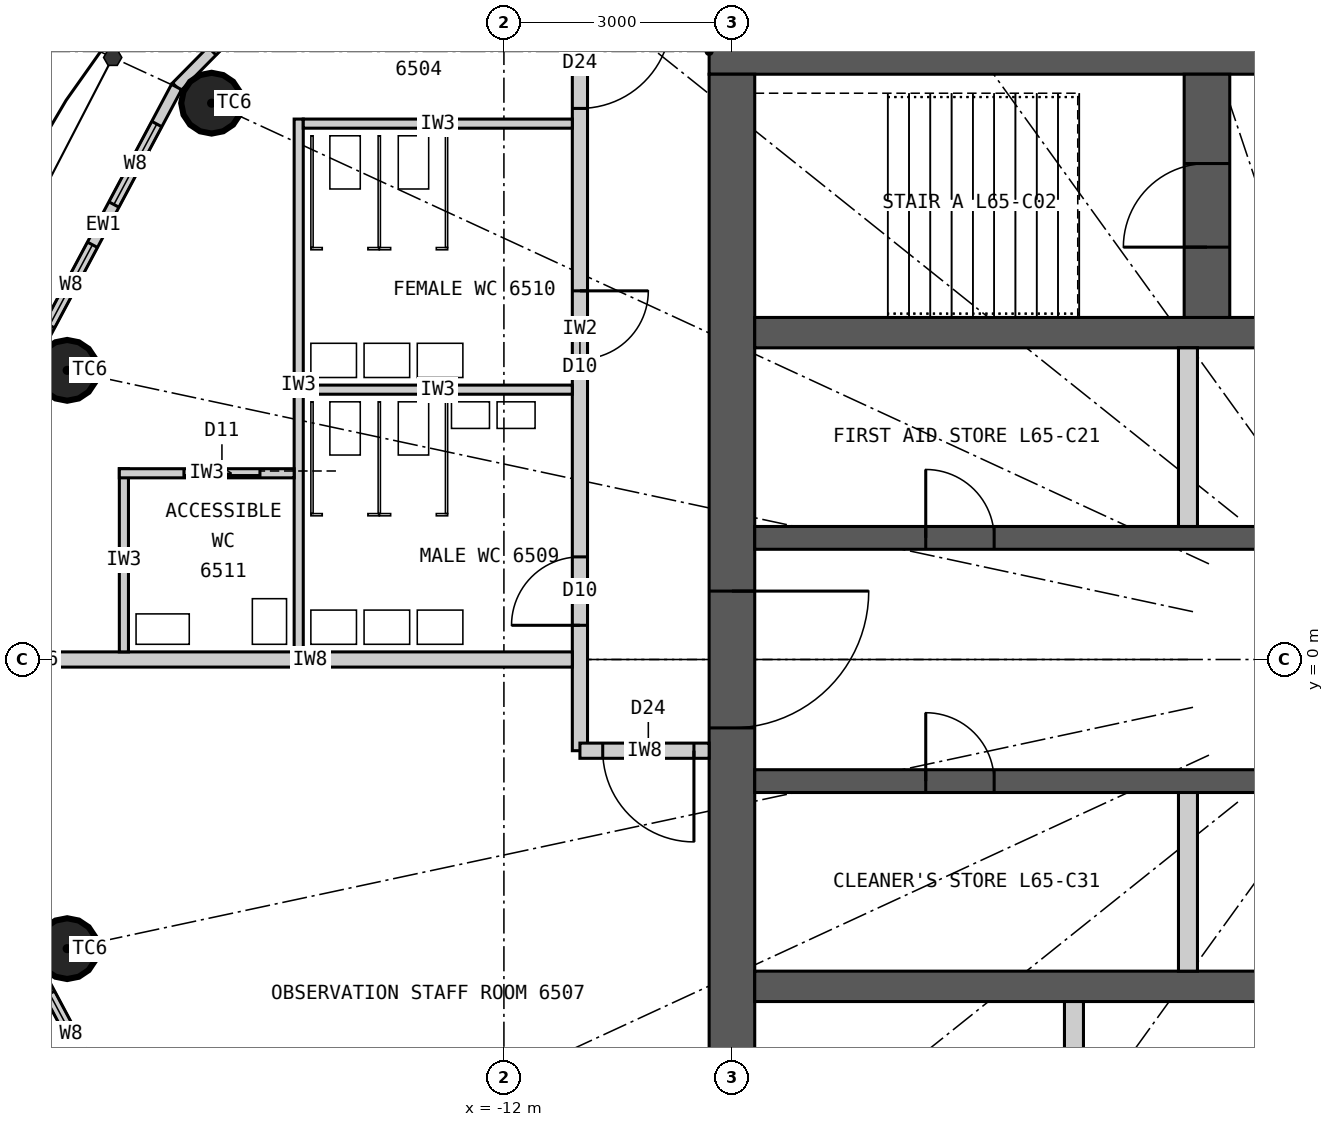
"""IFC4 building model, lengths in metres.
Left out: names, types, materials, properties, quantities, classifications, styles, units other than length and angle.
Written with IfcOpenShell. Run it as: python <this file> out.ifc"""

import sys

from ifc_helpers import new_model, si_unit, direction, frame, frame_2d, origin, origin_2d, place, context, subcontext, project, spatial, rectangle, circle, extrude, element, fill, save


model = new_model("IFC4")
c1 = context("Model", 3, precision=1e-05, world=origin(), true_north=direction((0.0, 1.0)))
c2 = subcontext(c1, "Body", "Model", "MODEL_VIEW")
j1 = project(units=[si_unit("LENGTHUNIT", "METRE"), si_unit("PLANEANGLEUNIT", "RADIAN")], contexts=[c1])
p1 = place(None, origin())
s1 = spatial("IfcSite", under=j1, at=p1, CompositionType="ELEMENT")
p2 = place(p1, origin())
s2 = spatial("IfcBuilding", under=s1, at=p2, CompositionType="ELEMENT")
p3 = place(p2, frame((0.0, 0.0, 242.7)))
s3 = spatial("IfcBuildingStorey", under=s2, at=p3, CompositionType="ELEMENT", Elevation=242.7)
for number, where, z_axis, x_axis in (
    (1, (-15.846, 7.319, 0.0), (0.0, 0.0, 1.0), (1.0, 0.0, 0.0)),
    (2, (-17.746, 3.804, 0.0), (0.0, 0.0, 1.0), (1.0, 0.0, 0.0)),
    (3, (-17.746, -3.804, 0.0), (0.0, 0.0, 1.0), (1.0, 0.0, 0.0)),
):
    element("IfcColumn", number, at=place(p3, frame(where, z_axis=z_axis, x_axis=x_axis)), inside=s3, PredefinedType="COLUMN", context=c2, shape_type="SweptSolid", body=[
        extrude(circle(Radius=0.4, at=origin_2d()), origin(), (0.0, 0.0, 1.0), 6.0),
    ])
p4 = place(p3, frame((-9.3, 8.0, 0.0), z_axis=(0.0, 0.0, 1.0), x_axis=(1.0, 0.0, 0.0)))
e4 = element("IfcWall", 4, at=p4, inside=s3, PredefinedType="SHEAR", context=c2, shape_type="SweptSolid", body=[
    extrude(rectangle(XDim=18.6, YDim=0.6, at=frame_2d((9.3, 0.0))), origin(), (0.0, 0.0, 1.0), 6.0),
])
p5 = place(p4, frame((8.0, 0.0, 0.0)))
e5 = element("IfcOpeningElement", 5, at=p5, cuts=e4, PredefinedType="OPENING", context=c2, shape_type="SweptSolid", body=[
    extrude(rectangle(XDim=1.2, YDim=2.2, at=frame_2d((0.6, 1.1))), frame((0.0, 0.31, 0.0), z_axis=(0.0, -1.0, 0.0), x_axis=(1.0, 0.0, 0.0)), (0.0, 0.0, 1.0), 0.62),
])
p6 = place(p4, frame((15.6, 0.0, 0.0)))
e6 = element("IfcOpeningElement", 6, at=p6, cuts=e4, PredefinedType="OPENING", context=c2, shape_type="SweptSolid", body=[
    extrude(rectangle(XDim=0.9, YDim=2.2, at=frame_2d((0.45, 1.1))), frame((0.0, 0.31, 0.0), z_axis=(0.0, -1.0, 0.0), x_axis=(1.0, 0.0, 0.0)), (0.0, 0.0, 1.0), 0.62),
])
p7 = place(p3, frame((-9.0, 7.7, 0.0), z_axis=(0.0, 0.0, 1.0), x_axis=(0.0, -1.0, 0.0)))
e7 = element("IfcWall", 7, at=p7, inside=s3, PredefinedType="SHEAR", context=c2, shape_type="SweptSolid", body=[
    extrude(rectangle(XDim=15.4, YDim=0.6, at=frame_2d((7.7, 0.0))), origin(), (0.0, 0.0, 1.0), 6.0),
])
p8 = place(p7, frame((6.8, 0.0, 0.0)))
e8 = element("IfcOpeningElement", 8, at=p8, cuts=e7, PredefinedType="OPENING", context=c2, shape_type="SweptSolid", body=[
    extrude(rectangle(XDim=1.8, YDim=2.2, at=frame_2d((0.9, 1.1))), frame((0.0, 0.31, 0.0), z_axis=(0.0, -1.0, 0.0), x_axis=(1.0, 0.0, 0.0)), (0.0, 0.0, 1.0), 0.62),
])
p9 = place(p3, frame((-8.7, 4.3, 0.0), z_axis=(0.0, 0.0, 1.0), x_axis=(1.0, 0.0, 0.0)))
e9 = element("IfcWall", 9, at=p9, inside=s3, PredefinedType="SHEAR", context=c2, shape_type="SweptSolid", body=[
    extrude(rectangle(XDim=17.4, YDim=0.4, at=frame_2d((8.7, 0.0))), origin(), (0.0, 0.0, 1.0), 6.0),
])
p10 = place(p3, frame((-8.7, 1.6, 0.0), z_axis=(0.0, 0.0, 1.0), x_axis=(1.0, 0.0, 0.0)))
e10 = element("IfcWall", 10, at=p10, inside=s3, PredefinedType="SHEAR", context=c2, shape_type="SweptSolid", body=[
    extrude(rectangle(XDim=17.4, YDim=0.3, at=frame_2d((8.7, 0.0))), origin(), (0.0, 0.0, 1.0), 6.0),
])
p11 = place(p10, frame((15.5, 0.0, 0.0)))
e11 = element("IfcOpeningElement", 11, at=p11, cuts=e10, PredefinedType="OPENING", context=c2, shape_type="SweptSolid", body=[
    extrude(rectangle(XDim=1.4, YDim=2.4, at=frame_2d((0.7, 1.2))), frame((0.0, 0.16, 0.0), z_axis=(0.0, -1.0, 0.0), x_axis=(1.0, 0.0, 0.0)), (0.0, 0.0, 1.0), 0.32),
])
p12 = place(p10, frame((2.25, 0.0, 0.0)))
e12 = element("IfcOpeningElement", 12, at=p12, cuts=e10, PredefinedType="OPENING", context=c2, shape_type="SweptSolid", body=[
    extrude(rectangle(XDim=0.9, YDim=2.2, at=frame_2d((0.45, 1.1))), frame((0.0, 0.16, 0.0), z_axis=(0.0, -1.0, 0.0), x_axis=(1.0, 0.0, 0.0)), (0.0, 0.0, 1.0), 0.32),
])
p13 = place(p10, frame((9.75, 0.0, 0.0)))
e13 = element("IfcOpeningElement", 13, at=p13, cuts=e10, PredefinedType="OPENING", context=c2, shape_type="SweptSolid", body=[
    extrude(rectangle(XDim=0.9, YDim=2.2, at=frame_2d((0.45, 1.1))), frame((0.0, 0.16, 0.0), z_axis=(0.0, -1.0, 0.0), x_axis=(1.0, 0.0, 0.0)), (0.0, 0.0, 1.0), 0.32),
])
p14 = place(p3, frame((-8.7, -4.3, 0.0), z_axis=(0.0, 0.0, 1.0), x_axis=(1.0, 0.0, 0.0)))
e14 = element("IfcWall", 14, at=p14, inside=s3, PredefinedType="SHEAR", context=c2, shape_type="SweptSolid", body=[
    extrude(rectangle(XDim=17.4, YDim=0.4, at=frame_2d((8.7, 0.0))), origin(), (0.0, 0.0, 1.0), 6.0),
])
p15 = place(p3, frame((-8.7, -1.6, 0.0), z_axis=(0.0, 0.0, 1.0), x_axis=(1.0, 0.0, 0.0)))
e15 = element("IfcWall", 15, at=p15, inside=s3, PredefinedType="SHEAR", context=c2, shape_type="SweptSolid", body=[
    extrude(rectangle(XDim=17.4, YDim=0.3, at=frame_2d((8.7, 0.0))), origin(), (0.0, 0.0, 1.0), 6.0),
])
p16 = place(p15, frame((12.4, 0.0, 0.0)))
e16 = element("IfcOpeningElement", 16, at=p16, cuts=e15, PredefinedType="OPENING", context=c2, shape_type="SweptSolid", body=[
    extrude(rectangle(XDim=1.6, YDim=2.4, at=frame_2d((0.8, 1.2))), frame((0.0, 0.16, 0.0), z_axis=(0.0, -1.0, 0.0), x_axis=(1.0, 0.0, 0.0)), (0.0, 0.0, 1.0), 0.32),
])
p17 = place(p15, frame((15.5, 0.0, 0.0)))
e17 = element("IfcOpeningElement", 17, at=p17, cuts=e15, PredefinedType="OPENING", context=c2, shape_type="SweptSolid", body=[
    extrude(rectangle(XDim=1.4, YDim=2.4, at=frame_2d((0.7, 1.2))), frame((0.0, 0.16, 0.0), z_axis=(0.0, -1.0, 0.0), x_axis=(1.0, 0.0, 0.0)), (0.0, 0.0, 1.0), 0.32),
])
p18 = place(p15, frame((2.25, 0.0, 0.0)))
e18 = element("IfcOpeningElement", 18, at=p18, cuts=e15, PredefinedType="OPENING", context=c2, shape_type="SweptSolid", body=[
    extrude(rectangle(XDim=0.9, YDim=2.2, at=frame_2d((0.45, 1.1))), frame((0.0, 0.16, 0.0), z_axis=(0.0, -1.0, 0.0), x_axis=(1.0, 0.0, 0.0)), (0.0, 0.0, 1.0), 0.32),
])
p19 = place(p15, frame((8.25, 0.0, 0.0)))
e19 = element("IfcOpeningElement", 19, at=p19, cuts=e15, PredefinedType="OPENING", context=c2, shape_type="SweptSolid", body=[
    extrude(rectangle(XDim=0.9, YDim=2.2, at=frame_2d((0.45, 1.1))), frame((0.0, 0.16, 0.0), z_axis=(0.0, -1.0, 0.0), x_axis=(1.0, 0.0, 0.0)), (0.0, 0.0, 1.0), 0.32),
])
p20 = place(p3, frame((-2.75, 4.5, 0.0), z_axis=(0.0, 0.0, 1.0), x_axis=(0.0, 1.0, 0.0)))
e20 = element("IfcWall", 20, at=p20, inside=s3, PredefinedType="SHEAR", context=c2, shape_type="SweptSolid", body=[
    extrude(rectangle(XDim=3.2, YDim=0.6, at=frame_2d((1.6, 0.0))), origin(), (0.0, 0.0, 1.0), 6.0),
])
p21 = place(p20, frame((0.925, 0.0, 0.0)))
e21 = element("IfcOpeningElement", 21, at=p21, cuts=e20, PredefinedType="OPENING", context=c2, shape_type="SweptSolid", body=[
    extrude(rectangle(XDim=1.1, YDim=2.2, at=frame_2d((0.55, 1.1))), frame((0.0, 0.31, 0.0), z_axis=(0.0, -1.0, 0.0), x_axis=(1.0, 0.0, 0.0)), (0.0, 0.0, 1.0), 0.62),
])
p22 = place(p3, frame((-4.5, -7.7, 0.0), z_axis=(0.0, 0.0, 1.0), x_axis=(0.0, 1.0, 0.0)))
e22 = element("IfcWall", 22, at=p22, inside=s3, PredefinedType="PARTITIONING", context=c2, shape_type="SweptSolid", body=[
    extrude(rectangle(XDim=3.2, YDim=0.25, at=frame_2d((1.6, 0.0))), origin(), (0.0, 0.0, 1.0), 6.0),
])
for number, where, z_axis, x_axis in (
    (23, (-3.0, 1.75, 0.0), (0.0, 0.0, 1.0), (0.0, 1.0, 0.0)),
    (24, (-3.0, -4.1, 0.0), (0.0, 0.0, 1.0), (0.0, 1.0, 0.0)),
):
    element("IfcWall", number, at=place(p3, frame(where, z_axis=z_axis, x_axis=x_axis)), inside=s3, PredefinedType="PARTITIONING", context=c2, shape_type="SweptSolid", body=[
        extrude(rectangle(XDim=2.35, YDim=0.25, at=frame_2d((1.175, 0.0))), origin(), (0.0, 0.0, 1.0), 6.0),
    ])
p23 = place(p3, frame((-13.266, 10.613, 0.0), z_axis=(0.0, 0.0, 1.0), x_axis=(-0.702523956258, -0.711660095048, 0.0)))
e25 = element("IfcWall", 25, at=p23, inside=s3, PredefinedType="ELEMENTEDWALL", context=c2, shape_type="SweptSolid", body=[
    extrude(rectangle(XDim=4.329, YDim=0.15, at=frame_2d((2.165, 0.0))), origin(), (0.0, 0.0, 1.0), 5.7),
])
p24 = place(p23, frame((0.665, 0.0, 0.5)))
e26 = element("IfcOpeningElement", 26, at=p24, cuts=e25, PredefinedType="OPENING", context=c2, shape_type="SweptSolid", body=[
    extrude(rectangle(XDim=1.2, YDim=4.2, at=frame_2d((0.6, 2.1))), frame((0.0, 0.085, 0.0), z_axis=(0.0, -1.0, 0.0), x_axis=(1.0, 0.0, 0.0)), (0.0, 0.0, 1.0), 0.17),
])
p25 = place(p23, frame((2.465, 0.0, 0.5)))
e27 = element("IfcOpeningElement", 27, at=p25, cuts=e25, PredefinedType="OPENING", context=c2, shape_type="SweptSolid", body=[
    extrude(rectangle(XDim=1.2, YDim=4.2, at=frame_2d((0.6, 2.1))), frame((0.0, 0.085, 0.0), z_axis=(0.0, -1.0, 0.0), x_axis=(1.0, 0.0, 0.0)), (0.0, 0.0, 1.0), 0.17),
])
p26 = place(p3, frame((-16.307, 7.532, 0.0), z_axis=(0.0, 0.0, 1.0), x_axis=(-0.470282591286, -0.882515883332, 0.0)))
e28 = element("IfcWall", 28, at=p26, inside=s3, PredefinedType="ELEMENTEDWALL", context=c2, shape_type="SweptSolid", body=[
    extrude(rectangle(XDim=4.105, YDim=0.15, at=frame_2d((2.052, 0.0))), origin(), (0.0, 0.0, 1.0), 5.7),
])
p27 = place(p26, frame((0.552, 0.0, 0.5)))
e29 = element("IfcOpeningElement", 29, at=p27, cuts=e28, PredefinedType="OPENING", context=c2, shape_type="SweptSolid", body=[
    extrude(rectangle(XDim=1.2, YDim=4.2, at=frame_2d((0.6, 2.1))), frame((0.0, 0.085, 0.0), z_axis=(0.0, -1.0, 0.0), x_axis=(1.0, 0.0, 0.0)), (0.0, 0.0, 1.0), 0.17),
])
p28 = place(p26, frame((2.353, 0.0, 0.5)))
e30 = element("IfcOpeningElement", 30, at=p28, cuts=e28, PredefinedType="OPENING", context=c2, shape_type="SweptSolid", body=[
    extrude(rectangle(XDim=1.2, YDim=4.2, at=frame_2d((0.6, 2.1))), frame((0.0, 0.085, 0.0), z_axis=(0.0, -1.0, 0.0), x_axis=(1.0, 0.0, 0.0)), (0.0, 0.0, 1.0), 0.17),
])
p29 = place(p3, frame((-18.238, -3.909, 0.0), z_axis=(0.0, 0.0, 1.0), x_axis=(0.470282591286, -0.882515883332, 0.0)))
e31 = element("IfcWall", 31, at=p29, inside=s3, PredefinedType="ELEMENTEDWALL", context=c2, shape_type="SweptSolid", body=[
    extrude(rectangle(XDim=4.105, YDim=0.15, at=frame_2d((2.052, 0.0))), origin(), (0.0, 0.0, 1.0), 5.7),
])
p30 = place(p29, frame((0.552, 0.0, 0.5)))
e32 = element("IfcOpeningElement", 32, at=p30, cuts=e31, PredefinedType="OPENING", context=c2, shape_type="SweptSolid", body=[
    extrude(rectangle(XDim=1.2, YDim=4.2, at=frame_2d((0.6, 2.1))), frame((0.0, 0.085, 0.0), z_axis=(0.0, -1.0, 0.0), x_axis=(1.0, 0.0, 0.0)), (0.0, 0.0, 1.0), 0.17),
])
p31 = place(p29, frame((2.353, 0.0, 0.5)))
e33 = element("IfcOpeningElement", 33, at=p31, cuts=e31, PredefinedType="OPENING", context=c2, shape_type="SweptSolid", body=[
    extrude(rectangle(XDim=1.2, YDim=4.2, at=frame_2d((0.6, 2.1))), frame((0.0, 0.085, 0.0), z_axis=(0.0, -1.0, 0.0), x_axis=(1.0, 0.0, 0.0)), (0.0, 0.0, 1.0), 0.17),
])
p32 = place(p3, frame((-11.0, 9.9, 0.0), z_axis=(0.0, 0.0, 1.0), x_axis=(0.0, -1.0, 0.0)))
e34 = element("IfcWall", 34, at=p32, inside=s3, PredefinedType="PARTITIONING", context=c2, shape_type="SweptSolid", body=[
    extrude(rectangle(XDim=11.1, YDim=0.2, at=frame_2d((5.55, 0.0))), origin(), (0.0, 0.0, 1.0), 5.7),
])
p33 = place(p32, frame((1.45, 0.0, 0.0)))
e35 = element("IfcOpeningElement", 35, at=p33, cuts=e34, PredefinedType="OPENING", context=c2, shape_type="SweptSolid", body=[
    extrude(rectangle(XDim=1.2, YDim=2.2, at=frame_2d((0.6, 1.1))), frame((0.0, 0.11, 0.0), z_axis=(0.0, -1.0, 0.0), x_axis=(1.0, 0.0, 0.0)), (0.0, 0.0, 1.0), 0.22),
])
p34 = place(p32, frame((8.55, 0.0, 0.0)))
e36 = element("IfcOpeningElement", 36, at=p34, cuts=e34, PredefinedType="OPENING", context=c2, shape_type="SweptSolid", body=[
    extrude(rectangle(XDim=0.9, YDim=2.1, at=frame_2d((0.45, 1.05))), frame((0.0, 0.11, 0.0), z_axis=(0.0, -1.0, 0.0), x_axis=(1.0, 0.0, 0.0)), (0.0, 0.0, 1.0), 0.22),
])
p35 = place(p32, frame((5.05, 0.0, 0.0)))
e37 = element("IfcOpeningElement", 37, at=p35, cuts=e34, PredefinedType="OPENING", context=c2, shape_type="SweptSolid", body=[
    extrude(rectangle(XDim=0.9, YDim=2.1, at=frame_2d((0.45, 1.05))), frame((0.0, 0.11, 0.0), z_axis=(0.0, -1.0, 0.0), x_axis=(1.0, 0.0, 0.0)), (0.0, 0.0, 1.0), 0.22),
])
p36 = place(p3, frame((-11.1, 0.0, 0.0), z_axis=(0.0, 0.0, 1.0), x_axis=(-1.0, 0.0, 0.0)))
e38 = element("IfcWall", 38, at=p36, inside=s3, PredefinedType="PARTITIONING", context=c2, shape_type="SweptSolid", body=[
    extrude(rectangle(XDim=6.9, YDim=0.2, at=frame_2d((3.45, 0.0))), origin(), (0.0, 0.0, 1.0), 4.85),
])
p37 = place(p3, frame((-9.3, -1.2, 0.0), z_axis=(0.0, 0.0, 1.0), x_axis=(-1.0, 0.0, 0.0)))
e39 = element("IfcWall", 39, at=p37, inside=s3, PredefinedType="PARTITIONING", context=c2, shape_type="SweptSolid", body=[
    extrude(rectangle(XDim=1.7, YDim=0.2, at=frame_2d((0.85, 0.0))), origin(), (0.0, 0.0, 1.0), 5.7),
])
p38 = place(p37, frame((0.2, 0.0, 0.0)))
e40 = element("IfcOpeningElement", 40, at=p38, cuts=e39, PredefinedType="OPENING", context=c2, shape_type="SweptSolid", body=[
    extrude(rectangle(XDim=1.2, YDim=2.2, at=frame_2d((0.6, 1.1))), frame((0.0, 0.11, 0.0), z_axis=(0.0, -1.0, 0.0), x_axis=(1.0, 0.0, 0.0)), (0.0, 0.0, 1.0), 0.22),
])
p39 = place(p3, frame((-14.7, 0.1, 0.0), z_axis=(0.0, 0.0, 1.0), x_axis=(0.0, 1.0, 0.0)))
e41 = element("IfcWall", 41, at=p39, inside=s3, PredefinedType="PARTITIONING", context=c2, shape_type="SweptSolid", body=[
    extrude(rectangle(XDim=7.01, YDim=0.12, at=frame_2d((3.505, 0.0))), origin(), (0.0, 0.0, 1.0), 5.7),
])
for number, where, z_axis, x_axis in (
    (42, (-11.1, 3.55, 0.0), (0.0, 0.0, 1.0), (-1.0, 0.0, 0.0)),
    (43, (-11.1, 7.05, 0.0), (0.0, 0.0, 1.0), (-1.0, 0.0, 0.0)),
):
    element("IfcWall", number, at=place(p3, frame(where, z_axis=z_axis, x_axis=x_axis)), inside=s3, PredefinedType="PARTITIONING", context=c2, shape_type="SweptSolid", body=[
        extrude(rectangle(XDim=3.54, YDim=0.12, at=frame_2d((1.77, 0.0))), origin(), (0.0, 0.0, 1.0), 5.7),
    ])
p40 = place(p3, frame((-17.0, 0.1, 0.0), z_axis=(0.0, 0.0, 1.0), x_axis=(0.0, 1.0, 0.0)))
e44 = element("IfcWall", 44, at=p40, inside=s3, PredefinedType="PARTITIONING", context=c2, shape_type="SweptSolid", body=[
    extrude(rectangle(XDim=2.41, YDim=0.12, at=frame_2d((1.205, 0.0))), origin(), (0.0, 0.0, 1.0), 5.7),
])
p41 = place(p3, frame((-14.76, 2.45, 0.0), z_axis=(0.0, 0.0, 1.0), x_axis=(-1.0, 0.0, 0.0)))
e45 = element("IfcWall", 45, at=p41, inside=s3, PredefinedType="PARTITIONING", context=c2, shape_type="SweptSolid", body=[
    extrude(rectangle(XDim=2.3, YDim=0.12, at=frame_2d((1.15, 0.0))), origin(), (0.0, 0.0, 1.0), 5.7),
])
p42 = place(p41, frame((0.45, 0.0, 0.0)))
e46 = element("IfcOpeningElement", 46, at=p42, cuts=e45, PredefinedType="OPENING", context=c2, shape_type="SweptSolid", body=[
    extrude(rectangle(XDim=1.0, YDim=2.2, at=frame_2d((0.5, 1.1))), frame((0.0, 0.07, 0.0), z_axis=(0.0, -1.0, 0.0), x_axis=(1.0, 0.0, 0.0)), (0.0, 0.0, 1.0), 0.14),
])
p43 = place(p25, origin())
e47 = element("IfcWindow", 47, at=p43, inside=s3, PartitioningType="SINGLE_PANEL", PredefinedType="WINDOW", context=c2, shape_type="SweptSolid", body=[
    extrude(rectangle(XDim=1.2, YDim=4.2, at=frame_2d((0.6, 2.1))), frame((0.0, 0.03, 0.0), z_axis=(0.0, -1.0, 0.0), x_axis=(1.0, 0.0, 0.0)), (0.0, 0.0, 1.0), 0.06),
])
fill(e27, e47)
p44 = place(p27, origin())
e48 = element("IfcWindow", 48, at=p44, inside=s3, PartitioningType="SINGLE_PANEL", PredefinedType="WINDOW", context=c2, shape_type="SweptSolid", body=[
    extrude(rectangle(XDim=1.2, YDim=4.2, at=frame_2d((0.6, 2.1))), frame((0.0, 0.03, 0.0), z_axis=(0.0, -1.0, 0.0), x_axis=(1.0, 0.0, 0.0)), (0.0, 0.0, 1.0), 0.06),
])
fill(e29, e48)
p45 = place(p28, origin())
e49 = element("IfcWindow", 49, at=p45, inside=s3, PartitioningType="SINGLE_PANEL", PredefinedType="WINDOW", context=c2, shape_type="SweptSolid", body=[
    extrude(rectangle(XDim=1.2, YDim=4.2, at=frame_2d((0.6, 2.1))), frame((0.0, 0.03, 0.0), z_axis=(0.0, -1.0, 0.0), x_axis=(1.0, 0.0, 0.0)), (0.0, 0.0, 1.0), 0.06),
])
fill(e30, e49)
p46 = place(p30, origin())
e50 = element("IfcWindow", 50, at=p46, inside=s3, PartitioningType="SINGLE_PANEL", PredefinedType="WINDOW", context=c2, shape_type="SweptSolid", body=[
    extrude(rectangle(XDim=1.2, YDim=4.2, at=frame_2d((0.6, 2.1))), frame((0.0, 0.03, 0.0), z_axis=(0.0, -1.0, 0.0), x_axis=(1.0, 0.0, 0.0)), (0.0, 0.0, 1.0), 0.06),
])
fill(e32, e50)
p47 = place(p38, origin())
e51 = element("IfcDoor", 51, at=p47, inside=s3, OperationType="SINGLE_SWING_LEFT", PredefinedType="DOOR", context=c2, shape_type="SweptSolid", body=[
    extrude(rectangle(XDim=1.2, YDim=2.2, at=frame_2d((0.6, 1.1))), frame((0.0, 0.025, 0.0), z_axis=(0.0, -1.0, 0.0), x_axis=(1.0, 0.0, 0.0)), (0.0, 0.0, 1.0), 0.05),
])
fill(e40, e51)
p48 = place(p33, origin())
e52 = element("IfcDoor", 52, at=p48, inside=s3, OperationType="SINGLE_SWING_LEFT", PredefinedType="DOOR", context=c2, shape_type="SweptSolid", body=[
    extrude(rectangle(XDim=1.2, YDim=2.2, at=frame_2d((0.6, 1.1))), frame((0.0, 0.025, 0.0), z_axis=(0.0, -1.0, 0.0), x_axis=(1.0, 0.0, 0.0)), (0.0, 0.0, 1.0), 0.05),
])
fill(e35, e52)
p49 = place(p34, origin())
e53 = element("IfcDoor", 53, at=p49, inside=s3, OperationType="SINGLE_SWING_RIGHT", PredefinedType="DOOR", context=c2, shape_type="SweptSolid", body=[
    extrude(rectangle(XDim=0.9, YDim=2.1, at=frame_2d((0.45, 1.05))), frame((0.0, 0.025, 0.0), z_axis=(0.0, -1.0, 0.0), x_axis=(1.0, 0.0, 0.0)), (0.0, 0.0, 1.0), 0.05),
])
fill(e36, e53)
p50 = place(p35, origin())
e54 = element("IfcDoor", 54, at=p50, inside=s3, OperationType="SINGLE_SWING_LEFT", PredefinedType="DOOR", context=c2, shape_type="SweptSolid", body=[
    extrude(rectangle(XDim=0.9, YDim=2.1, at=frame_2d((0.45, 1.05))), frame((0.0, 0.025, 0.0), z_axis=(0.0, -1.0, 0.0), x_axis=(1.0, 0.0, 0.0)), (0.0, 0.0, 1.0), 0.05),
])
fill(e37, e54)
p51 = place(p42, origin())
e55 = element("IfcDoor", 55, at=p51, inside=s3, OperationType="SLIDING_TO_LEFT", PredefinedType="DOOR", context=c2, shape_type="SweptSolid", body=[
    extrude(rectangle(XDim=1.0, YDim=2.2, at=frame_2d((0.5, 1.1))), frame((0.0, 0.025, 0.0), z_axis=(0.0, -1.0, 0.0), x_axis=(1.0, 0.0, 0.0)), (0.0, 0.0, 1.0), 0.05),
])
fill(e46, e55)
p52 = place(p21, origin())
e56 = element("IfcDoor", 56, at=p52, inside=s3, OperationType="SINGLE_SWING_LEFT", PredefinedType="DOOR", context=c2, shape_type="SweptSolid", body=[
    extrude(rectangle(XDim=1.1, YDim=2.2, at=frame_2d((0.55, 1.1))), frame((0.0, 0.025, 0.0), z_axis=(0.0, -1.0, 0.0), x_axis=(1.0, 0.0, 0.0)), (0.0, 0.0, 1.0), 0.05),
])
fill(e21, e56)
p53 = place(p12, origin())
e57 = element("IfcDoor", 57, at=p53, inside=s3, OperationType="SINGLE_SWING_LEFT", PredefinedType="DOOR", context=c2, shape_type="SweptSolid", body=[
    extrude(rectangle(XDim=0.9, YDim=2.2, at=frame_2d((0.45, 1.1))), frame((0.0, 0.025, 0.0), z_axis=(0.0, -1.0, 0.0), x_axis=(1.0, 0.0, 0.0)), (0.0, 0.0, 1.0), 0.05),
])
fill(e12, e57)
p54 = place(p18, origin())
e58 = element("IfcDoor", 58, at=p54, inside=s3, OperationType="SINGLE_SWING_LEFT", PredefinedType="DOOR", context=c2, shape_type="SweptSolid", body=[
    extrude(rectangle(XDim=0.9, YDim=2.2, at=frame_2d((0.45, 1.1))), frame((0.0, 0.025, 0.0), z_axis=(0.0, -1.0, 0.0), x_axis=(1.0, 0.0, 0.0)), (0.0, 0.0, 1.0), 0.05),
])
fill(e18, e58)
p55 = place(p8, origin())
e59 = element("IfcDoor", 59, at=p55, inside=s3, OperationType="DOUBLE_DOOR_DOUBLE_SWING", PredefinedType="DOOR", context=c2, shape_type="SweptSolid", body=[
    extrude(rectangle(XDim=1.8, YDim=2.2, at=frame_2d((0.9, 1.1))), frame((0.0, 0.025, 0.0), z_axis=(0.0, -1.0, 0.0), x_axis=(1.0, 0.0, 0.0)), (0.0, 0.0, 1.0), 0.05),
])
fill(e8, e59)
save(model, sys.argv[1])
